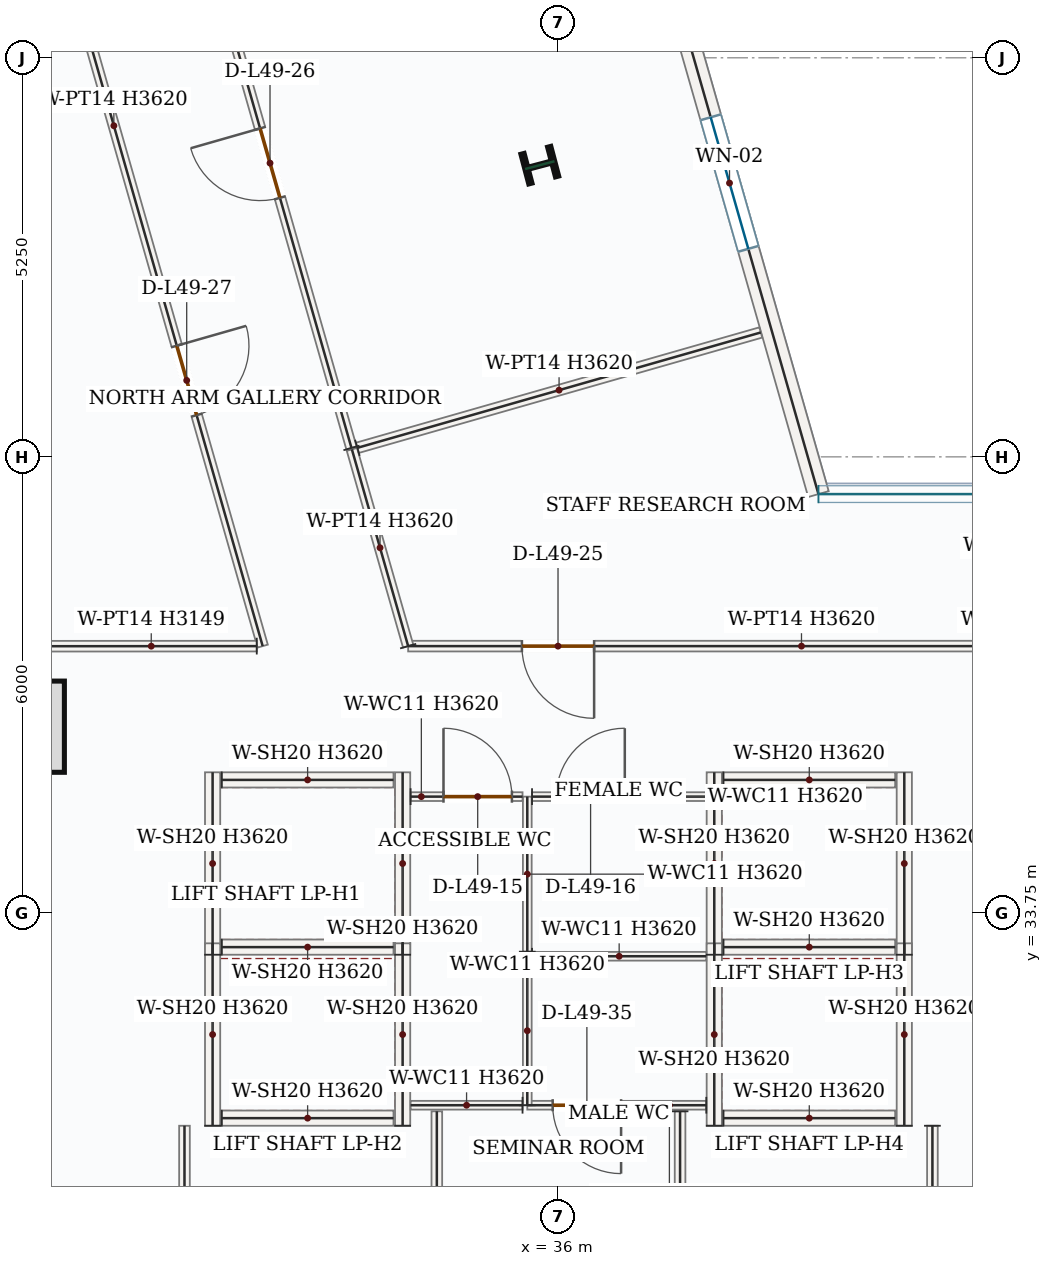
"""IFC4 building model, lengths in metres.
Left out: names, types, materials, properties, quantities, classifications, styles, units other than length and angle.
Written with IfcOpenShell. Run it as: python <this file> out.ifc"""

import sys

from ifc_helpers import new_model, si_unit, direction, frame, frame_2d, origin, origin_2d, place, context, subcontext, project, spatial, rectangle, i_section, extrude, source, transform, mapped, element, fill, save


model = new_model("IFC4")
c1 = context("Model", 3, precision=1e-05, world=origin(), true_north=direction((0.0, 1.0)))
c2 = subcontext(c1, "Body", "Model", "MODEL_VIEW")
j1 = project(units=[si_unit("LENGTHUNIT", "METRE"), si_unit("PLANEANGLEUNIT", "RADIAN")], contexts=[c1])
p1 = place(None, origin())
s1 = spatial("IfcSite", under=j1, at=p1, CompositionType="ELEMENT")
p2 = place(p1, origin())
s2 = spatial("IfcBuilding", under=s1, at=p2, CompositionType="ELEMENT")
p3 = place(p2, frame((0.0, 0.0, 209.7)))
s3 = spatial("IfcBuildingStorey", under=s2, at=p3, CompositionType="ELEMENT", Elevation=209.7)
m1 = source(origin(), c2, "Body", "SweptSolid", [
    extrude(rectangle(XDim=1.2, YDim=1.2, at=origin_2d()), origin(), (0.0, 0.0, 1.0), 3.9),
])
p4 = place(p3, frame((28.9, 36.2, 0.0), z_axis=(0.0, 0.0, 1.0), x_axis=(1.0, 0.0, 0.0)))
e1 = element("IfcColumn", 1, at=p4, inside=s3, PredefinedType="COLUMN", context=c2, shape_type="MappedRepresentation", body=[
    mapped(m1, transform((0.0, 0.0, 0.0), x_axis=(1.0, 0.0, 0.0), y_axis=(0.0, 1.0, 0.0), z_axis=(0.0, 0.0, 1.0), scale=1.0)),
])
m2 = source(origin(), c2, "Body", "SweptSolid", [
    extrude(i_section(OverallWidth=0.404, OverallDepth=0.407, WebThickness=0.027, FlangeThickness=0.044, FilletRadius=0.018, at=origin_2d()), origin(), (0.0, 0.0, 1.0), 3.9),
])
p5 = place(p3, frame((35.755, 43.588, 0.0), z_axis=(0.0, 0.0, 1.0), x_axis=(-0.255445757936, 0.966823388604, 0.0)))
e2 = element("IfcColumn", 2, at=p5, inside=s3, PredefinedType="COLUMN", context=c2, shape_type="MappedRepresentation", body=[
    mapped(m2, transform((0.0, 0.0, 0.0), x_axis=(1.0, 0.0, 0.0), y_axis=(0.0, 1.0, 0.0), z_axis=(0.0, 0.0, 1.0), scale=1.0)),
])
p6 = place(p3, frame((37.08, 47.445, 0.0), z_axis=(0.0, 0.0, 1.0), x_axis=(0.27496352843, -0.961454657295, 0.0)))
e3 = element("IfcWall", 3, at=p6, inside=s3, PredefinedType="SOLIDWALL", context=c2, shape_type="SweptSolid", body=[
    extrude(rectangle(XDim=8.513, YDim=0.28, at=frame_2d((4.257, 0.0))), origin(), (0.0, 0.0, 1.0), 3.62),
])
p7 = place(p6, frame((3.357, 0.0, 0.85)))
e4 = element("IfcOpeningElement", 4, at=p7, cuts=e3, PredefinedType="OPENING", context=c2, shape_type="SweptSolid", body=[
    extrude(rectangle(XDim=1.8, YDim=1.75, at=frame_2d((0.9, 0.875))), frame((0.0, 0.15, 0.0), z_axis=(0.0, -1.0, 0.0), x_axis=(1.0, 0.0, 0.0)), (0.0, 0.0, 1.0), 0.3),
])
m3 = source(origin(), c2, "Body", "SweptSolid", [
    extrude(rectangle(XDim=2.4, YDim=0.2, at=frame_2d((1.2, 0.0))), origin(), (0.0, 0.0, 1.0), 3.62),
])
for number, where, z_axis, x_axis in (
    (5, (31.45, 33.2, 0.0), (0.0, 0.0, 1.0), (0.0, 1.0, 0.0)),
    (6, (33.95, 33.2, 0.0), (0.0, 0.0, 1.0), (0.0, 1.0, 0.0)),
):
    element("IfcWall", number, at=place(p3, frame(where, z_axis=z_axis, x_axis=x_axis)), inside=s3, PredefinedType="SOLIDWALL", context=c2, shape_type="MappedRepresentation", body=[
        mapped(m3, transform((0.0, 0.0, 0.0), x_axis=(1.0, 0.0, 0.0), y_axis=(0.0, 1.0, 0.0), z_axis=(0.0, 0.0, 1.0), scale=1.0)),
    ])
m4 = source(origin(), c2, "Body", "SweptSolid", [
    extrude(rectangle(XDim=2.26, YDim=0.2, at=frame_2d((1.13, 0.0))), origin(), (0.0, 0.0, 1.0), 3.62),
])
for number, where, z_axis, x_axis in (
    (7, (31.57, 33.3, 0.0), (0.0, 0.0, 1.0), (1.0, 0.0, 0.0)),
    (8, (31.57, 35.5, 0.0), (0.0, 0.0, 1.0), (1.0, 0.0, 0.0)),
):
    element("IfcWall", number, at=place(p3, frame(where, z_axis=z_axis, x_axis=x_axis)), inside=s3, PredefinedType="SOLIDWALL", context=c2, shape_type="MappedRepresentation", body=[
        mapped(m4, transform((0.0, 0.0, 0.0), x_axis=(1.0, 0.0, 0.0), y_axis=(0.0, 1.0, 0.0), z_axis=(0.0, 0.0, 1.0), scale=1.0)),
    ])
for number, where, z_axis, x_axis in (
    (9, (31.45, 30.95, 0.0), (0.0, 0.0, 1.0), (0.0, 1.0, 0.0)),
    (10, (33.95, 30.95, 0.0), (0.0, 0.0, 1.0), (0.0, 1.0, 0.0)),
):
    element("IfcWall", number, at=place(p3, frame(where, z_axis=z_axis, x_axis=x_axis)), inside=s3, PredefinedType="SOLIDWALL", context=c2, shape_type="MappedRepresentation", body=[
        mapped(m3, transform((0.0, 0.0, 0.0), x_axis=(1.0, 0.0, 0.0), y_axis=(0.0, 1.0, 0.0), z_axis=(0.0, 0.0, 1.0), scale=1.0)),
    ])
p8 = place(p3, frame((31.57, 31.05, 0.0), z_axis=(0.0, 0.0, 1.0), x_axis=(1.0, 0.0, 0.0)))
e11 = element("IfcWall", 11, at=p8, inside=s3, PredefinedType="SOLIDWALL", context=c2, shape_type="MappedRepresentation", body=[
    mapped(m4, transform((0.0, 0.0, 0.0), x_axis=(1.0, 0.0, 0.0), y_axis=(0.0, 1.0, 0.0), z_axis=(0.0, 0.0, 1.0), scale=1.0)),
])
for number, where, z_axis, x_axis in (
    (12, (38.05, 33.2, 0.0), (0.0, 0.0, 1.0), (0.0, 1.0, 0.0)),
    (13, (40.55, 33.2, 0.0), (0.0, 0.0, 1.0), (0.0, 1.0, 0.0)),
):
    element("IfcWall", number, at=place(p3, frame(where, z_axis=z_axis, x_axis=x_axis)), inside=s3, PredefinedType="SOLIDWALL", context=c2, shape_type="MappedRepresentation", body=[
        mapped(m3, transform((0.0, 0.0, 0.0), x_axis=(1.0, 0.0, 0.0), y_axis=(0.0, 1.0, 0.0), z_axis=(0.0, 0.0, 1.0), scale=1.0)),
    ])
for number, where, z_axis, x_axis in (
    (14, (38.17, 33.3, 0.0), (0.0, 0.0, 1.0), (1.0, 0.0, 0.0)),
    (15, (38.17, 35.5, 0.0), (0.0, 0.0, 1.0), (1.0, 0.0, 0.0)),
):
    element("IfcWall", number, at=place(p3, frame(where, z_axis=z_axis, x_axis=x_axis)), inside=s3, PredefinedType="SOLIDWALL", context=c2, shape_type="MappedRepresentation", body=[
        mapped(m4, transform((0.0, 0.0, 0.0), x_axis=(1.0, 0.0, 0.0), y_axis=(0.0, 1.0, 0.0), z_axis=(0.0, 0.0, 1.0), scale=1.0)),
    ])
for number, where, z_axis, x_axis in (
    (16, (38.05, 30.95, 0.0), (0.0, 0.0, 1.0), (0.0, 1.0, 0.0)),
    (17, (40.55, 30.95, 0.0), (0.0, 0.0, 1.0), (0.0, 1.0, 0.0)),
):
    element("IfcWall", number, at=place(p3, frame(where, z_axis=z_axis, x_axis=x_axis)), inside=s3, PredefinedType="SOLIDWALL", context=c2, shape_type="MappedRepresentation", body=[
        mapped(m3, transform((0.0, 0.0, 0.0), x_axis=(1.0, 0.0, 0.0), y_axis=(0.0, 1.0, 0.0), z_axis=(0.0, 0.0, 1.0), scale=1.0)),
    ])
p9 = place(p3, frame((38.17, 31.05, 0.0), z_axis=(0.0, 0.0, 1.0), x_axis=(1.0, 0.0, 0.0)))
e18 = element("IfcWall", 18, at=p9, inside=s3, PredefinedType="SOLIDWALL", context=c2, shape_type="MappedRepresentation", body=[
    mapped(m4, transform((0.0, 0.0, 0.0), x_axis=(1.0, 0.0, 0.0), y_axis=(0.0, 1.0, 0.0), z_axis=(0.0, 0.0, 1.0), scale=1.0)),
])
p10 = place(p3, frame((37.945, 31.22, 0.0), z_axis=(0.0, 0.0, 1.0), x_axis=(-1.0, 0.0, 0.0)))
e19 = element("IfcWall", 19, at=p10, inside=s3, PredefinedType="PARTITIONING", context=c2, shape_type="SweptSolid", body=[
    extrude(rectangle(XDim=2.355, YDim=0.115, at=frame_2d((1.177, 0.0))), origin(), (0.0, 0.0, 1.0), 3.62),
])
p11 = place(p10, frame((1.121, 0.0, 0.0)))
e20 = element("IfcOpeningElement", 20, at=p11, cuts=e19, PredefinedType="OPENING", context=c2, shape_type="SweptSolid", body=[
    extrude(rectangle(XDim=0.9, YDim=2.1, at=frame_2d((0.45, 1.05))), frame((0.0, 0.067, 0.0), z_axis=(0.0, -1.0, 0.0), x_axis=(1.0, 0.0, 0.0)), (0.0, 0.0, 1.0), 0.135),
])
m5 = source(origin(), c2, "Body", "SweptSolid", [
    extrude(rectangle(XDim=1.96, YDim=0.115, at=frame_2d((0.98, 0.0))), origin(), (0.0, 0.0, 1.0), 3.62),
])
p12 = place(p3, frame((35.59, 31.22, 0.0), z_axis=(0.0, 0.0, 1.0), x_axis=(0.0, 1.0, 0.0)))
e21 = element("IfcWall", 21, at=p12, inside=s3, PredefinedType="PARTITIONING", context=c2, shape_type="MappedRepresentation", body=[
    mapped(m5, transform((0.0, 0.0, 0.0), x_axis=(1.0, 0.0, 0.0), y_axis=(0.0, 1.0, 0.0), z_axis=(0.0, 0.0, 1.0), scale=1.0)),
])
m6 = source(origin(), c2, "Body", "SweptSolid", [
    extrude(rectangle(XDim=2.292, YDim=0.115, at=frame_2d((1.146, 0.0))), origin(), (0.0, 0.0, 1.0), 3.62),
])
p13 = place(p3, frame((35.653, 33.18, 0.0), z_axis=(0.0, 0.0, 1.0), x_axis=(1.0, 0.0, 0.0)))
e22 = element("IfcWall", 22, at=p13, inside=s3, PredefinedType="PARTITIONING", context=c2, shape_type="MappedRepresentation", body=[
    mapped(m6, transform((0.0, 0.0, 0.0), x_axis=(1.0, 0.0, 0.0), y_axis=(0.0, 1.0, 0.0), z_axis=(0.0, 0.0, 1.0), scale=1.0)),
])
m7 = source(origin(), c2, "Body", "SweptSolid", [
    extrude(rectangle(XDim=2.04, YDim=0.115, at=frame_2d((1.02, 0.0))), origin(), (0.0, 0.0, 1.0), 3.62),
])
p14 = place(p3, frame((35.59, 33.24, 0.0), z_axis=(0.0, 0.0, 1.0), x_axis=(0.0, 1.0, 0.0)))
e23 = element("IfcWall", 23, at=p14, inside=s3, PredefinedType="PARTITIONING", context=c2, shape_type="MappedRepresentation", body=[
    mapped(m7, transform((0.0, 0.0, 0.0), x_axis=(1.0, 0.0, 0.0), y_axis=(0.0, 1.0, 0.0), z_axis=(0.0, 0.0, 1.0), scale=1.0)),
])
p15 = place(p3, frame((35.653, 35.28, 0.0), z_axis=(0.0, 0.0, 1.0), x_axis=(1.0, 0.0, 0.0)))
e24 = element("IfcWall", 24, at=p15, inside=s3, PredefinedType="PARTITIONING", context=c2, shape_type="SweptSolid", body=[
    extrude(rectangle(XDim=2.292, YDim=0.115, at=frame_2d((1.146, 0.0))), origin(), (0.0, 0.0, 1.0), 3.62),
])
p16 = place(p15, frame((0.32, 0.0, 0.0)))
e25 = element("IfcOpeningElement", 25, at=p16, cuts=e24, PredefinedType="OPENING", context=c2, shape_type="SweptSolid", body=[
    extrude(rectangle(XDim=0.9, YDim=2.1, at=frame_2d((0.45, 1.05))), frame((0.0, 0.067, 0.0), z_axis=(0.0, -1.0, 0.0), x_axis=(1.0, 0.0, 0.0)), (0.0, 0.0, 1.0), 0.135),
])
m8 = source(origin(), c2, "Body", "SweptSolid", [
    extrude(rectangle(XDim=1.473, YDim=0.115, at=frame_2d((0.736, 0.0))), origin(), (0.0, 0.0, 1.0), 3.62),
])
p17 = place(p3, frame((35.528, 31.22, 0.0), z_axis=(0.0, 0.0, 1.0), x_axis=(-1.0, 0.0, 0.0)))
e26 = element("IfcWall", 26, at=p17, inside=s3, PredefinedType="PARTITIONING", context=c2, shape_type="MappedRepresentation", body=[
    mapped(m8, transform((0.0, 0.0, 0.0), x_axis=(1.0, 0.0, 0.0), y_axis=(0.0, 1.0, 0.0), z_axis=(0.0, 0.0, 1.0), scale=1.0)),
])
p18 = place(p3, frame((34.055, 35.28, 0.0), z_axis=(0.0, 0.0, 1.0), x_axis=(1.0, 0.0, 0.0)))
e27 = element("IfcWall", 27, at=p18, inside=s3, PredefinedType="PARTITIONING", context=c2, shape_type="SweptSolid", body=[
    extrude(rectangle(XDim=1.473, YDim=0.115, at=frame_2d((0.736, 0.0))), origin(), (0.0, 0.0, 1.0), 3.62),
])
p19 = place(p18, frame((0.433, 0.0, 0.0)))
e28 = element("IfcOpeningElement", 28, at=p19, cuts=e27, PredefinedType="OPENING", context=c2, shape_type="SweptSolid", body=[
    extrude(rectangle(XDim=0.9, YDim=2.1, at=frame_2d((0.45, 1.05))), frame((0.0, 0.067, 0.0), z_axis=(0.0, -1.0, 0.0), x_axis=(1.0, 0.0, 0.0)), (0.0, 0.0, 1.0), 0.135),
])
m9 = source(origin(), c2, "Body", "SweptSolid", [
    extrude(rectangle(XDim=3.2, YDim=0.14, at=frame_2d((1.6, 0.0))), origin(), (0.0, 0.0, 1.0), 3.62),
])
for number, where, z_axis, x_axis in (
    (29, (34.4, 27.94, 0.0), (0.0, 0.0, 1.0), (0.0, 1.0, 0.0)),
    (30, (37.6, 31.14, 0.0), (0.0, 0.0, 1.0), (0.0, -1.0, 0.0)),
):
    element("IfcWall", number, at=place(p3, frame(where, z_axis=z_axis, x_axis=x_axis)), inside=s3, PredefinedType="PARTITIONING", context=c2, shape_type="MappedRepresentation", body=[
        mapped(m9, transform((0.0, 0.0, 0.0), x_axis=(1.0, 0.0, 0.0), y_axis=(0.0, 1.0, 0.0), z_axis=(0.0, 0.0, 1.0), scale=1.0)),
    ])
m10 = source(origin(), c2, "Body", "SweptSolid", [
    extrude(rectangle(XDim=2.935, YDim=0.14, at=frame_2d((1.468, 0.0))), origin(), (0.0, 0.0, 1.0), 3.62),
])
p20 = place(p3, frame((31.08, 28.015, 0.0), z_axis=(0.0, 0.0, 1.0), x_axis=(0.0, 1.0, 0.0)))
e31 = element("IfcWall", 31, at=p20, inside=s3, PredefinedType="PARTITIONING", context=c2, shape_type="MappedRepresentation", body=[
    mapped(m10, transform((0.0, 0.0, 0.0), x_axis=(1.0, 0.0, 0.0), y_axis=(0.0, 1.0, 0.0), z_axis=(0.0, 0.0, 1.0), scale=1.0)),
])
m11 = source(origin(), c2, "Body", "SweptSolid", [
    extrude(rectangle(XDim=3.01, YDim=0.14, at=frame_2d((1.505, 0.0))), origin(), (0.0, 0.0, 1.0), 3.62),
])
p21 = place(p3, frame((40.92, 30.95, 0.0), z_axis=(0.0, 0.0, 1.0), x_axis=(0.0, -1.0, 0.0)))
e32 = element("IfcWall", 32, at=p21, inside=s3, PredefinedType="PARTITIONING", context=c2, shape_type="MappedRepresentation", body=[
    mapped(m11, transform((0.0, 0.0, 0.0), x_axis=(1.0, 0.0, 0.0), y_axis=(0.0, 1.0, 0.0), z_axis=(0.0, 0.0, 1.0), scale=1.0)),
])
p22 = place(p3, frame((41.775, 37.26, 0.0), z_axis=(0.0, 0.0, 1.0), x_axis=(-1.0, 0.0, 0.0)))
e33 = element("IfcWall", 33, at=p22, inside=s3, PredefinedType="PARTITIONING", context=c2, shape_type="SweptSolid", body=[
    extrude(rectangle(XDim=7.753, YDim=0.14, at=frame_2d((3.876, 0.0))), origin(), (0.0, 0.0, 1.0), 3.62),
])
p23 = place(p22, frame((5.306, 0.0, 0.0)))
e34 = element("IfcOpeningElement", 34, at=p23, cuts=e33, PredefinedType="OPENING", context=c2, shape_type="SweptSolid", body=[
    extrude(rectangle(XDim=0.95, YDim=2.15, at=frame_2d((0.475, 1.075))), frame((0.0, 0.08, 0.0), z_axis=(0.0, -1.0, 0.0), x_axis=(1.0, 0.0, 0.0)), (0.0, 0.0, 1.0), 0.16),
])
m12 = source(origin(), c2, "Body", "SweptSolid", [
    extrude(rectangle(XDim=2.692, YDim=0.14, at=frame_2d((1.346, 0.0))), origin(), (0.0, 0.0, 1.0), 3.62),
])
p24 = place(p3, frame((34.023, 37.26, 0.0), z_axis=(0.0, 0.0, 1.0), x_axis=(-0.27500862401, 0.961441759401, 0.0)))
e35 = element("IfcWall", 35, at=p24, inside=s3, PredefinedType="PARTITIONING", context=c2, shape_type="MappedRepresentation", body=[
    mapped(m12, transform((0.0, 0.0, 0.0), x_axis=(1.0, 0.0, 0.0), y_axis=(0.0, 1.0, 0.0), z_axis=(0.0, 0.0, 1.0), scale=1.0)),
])
m13 = source(origin(), c2, "Body", "SweptSolid", [
    extrude(rectangle(XDim=5.52, YDim=0.14, at=frame_2d((2.76, 0.0))), origin(), (0.0, 0.0, 1.0), 3.62),
])
p25 = place(p3, frame((33.354, 39.869, 0.0), z_axis=(0.0, 0.0, 1.0), x_axis=(0.961455490798, 0.274960613933, 0.0)))
e36 = element("IfcWall", 36, at=p25, inside=s3, PredefinedType="PARTITIONING", context=c2, shape_type="MappedRepresentation", body=[
    mapped(m13, transform((0.0, 0.0, 0.0), x_axis=(1.0, 0.0, 0.0), y_axis=(0.0, 1.0, 0.0), z_axis=(0.0, 0.0, 1.0), scale=1.0)),
])
p26 = place(p3, frame((33.277, 39.867, 0.0), z_axis=(0.0, 0.0, 1.0), x_axis=(-0.274985856522, 0.96144827147, 0.0)))
e37 = element("IfcWall", 37, at=p26, inside=s3, PredefinedType="PARTITIONING", context=c2, shape_type="SweptSolid", body=[
    extrude(rectangle(XDim=7.795, YDim=0.14, at=frame_2d((3.897, 0.0))), origin(), (0.0, 0.0, 1.0), 3.62),
])
p27 = place(p26, frame((3.423, 0.0, 0.0)))
e38 = element("IfcOpeningElement", 38, at=p27, cuts=e37, PredefinedType="OPENING", context=c2, shape_type="SweptSolid", body=[
    extrude(rectangle(XDim=0.95, YDim=2.15, at=frame_2d((0.475, 1.075))), frame((0.0, 0.08, 0.0), z_axis=(0.0, -1.0, 0.0), x_axis=(1.0, 0.0, 0.0)), (0.0, 0.0, 1.0), 0.16),
])
p28 = place(p3, frame((29.365, 46.856, 0.0), z_axis=(0.0, 0.0, 1.0), x_axis=(0.274969885882, -0.961452839123, 0.0)))
e39 = element("IfcWall", 39, at=p28, inside=s3, PredefinedType="PARTITIONING", context=c2, shape_type="SweptSolid", body=[
    extrude(rectangle(XDim=9.981, YDim=0.14, at=frame_2d((4.99, 0.0))), origin(), (0.0, 0.0, 1.0), 3.62),
])
p29 = place(p28, frame((5.87, 0.0, 0.0)))
e40 = element("IfcOpeningElement", 40, at=p29, cuts=e39, PredefinedType="OPENING", context=c2, shape_type="SweptSolid", body=[
    extrude(rectangle(XDim=0.95, YDim=2.15, at=frame_2d((0.475, 1.075))), frame((0.0, 0.08, 0.0), z_axis=(0.0, -1.0, 0.0), x_axis=(1.0, 0.0, 0.0)), (0.0, 0.0, 1.0), 0.16),
])
m14 = source(origin(), c2, "Body", "SweptSolid", [
    extrude(rectangle(XDim=2.776, YDim=0.14, at=frame_2d((1.388, 0.0))), origin(), (0.0, 0.0, 1.0), 3.149),
])
p30 = place(p3, frame((32.031, 37.26, 0.0), z_axis=(0.0, 0.0, 1.0), x_axis=(-0.999999903325, -0.000439715022, 0.0)))
e41 = element("IfcWall", 41, at=p30, inside=s3, PredefinedType="PARTITIONING", context=c2, shape_type="MappedRepresentation", body=[
    mapped(m14, transform((0.0, 0.0, 0.0), x_axis=(1.0, 0.0, 0.0), y_axis=(0.0, 1.0, 0.0), z_axis=(0.0, 0.0, 1.0), scale=1.0)),
])
m15 = source(origin(), c2, "Body", "SweptSolid", [
    extrude(rectangle(XDim=1.8, YDim=1.75, at=frame_2d((0.9, 0.875))), frame((0.0, 0.03, 0.0), z_axis=(0.0, -1.0, 0.0), x_axis=(1.0, 0.0, 0.0)), (0.0, 0.0, 1.0), 0.06),
])
p31 = place(p7, origin())
e42 = element("IfcWindow", 42, at=p31, inside=s3, PartitioningType="DOUBLE_PANEL_VERTICAL", PredefinedType="WINDOW", context=c2, shape_type="MappedRepresentation", body=[
    mapped(m15, transform((0.0, 0.0, 0.0), x_axis=(1.0, 0.0, 0.0), y_axis=(0.0, 1.0, 0.0), z_axis=(0.0, 0.0, 1.0), scale=1.0)),
])
fill(e4, e42)
m16 = source(origin(), c2, "Body", "SweptSolid", [
    extrude(rectangle(XDim=0.9, YDim=2.1, at=frame_2d((0.45, 1.05))), frame((0.0, 0.025, 0.0), z_axis=(0.0, -1.0, 0.0), x_axis=(1.0, 0.0, 0.0)), (0.0, 0.0, 1.0), 0.05),
])
p32 = place(p19, origin())
e43 = element("IfcDoor", 43, at=p32, inside=s3, OperationType="SINGLE_SWING_LEFT", PredefinedType="DOOR", context=c2, shape_type="MappedRepresentation", body=[
    mapped(m16, transform((0.0, 0.0, 0.0), x_axis=(1.0, 0.0, 0.0), y_axis=(0.0, 1.0, 0.0), z_axis=(0.0, 0.0, 1.0), scale=1.0)),
])
fill(e28, e43)
p33 = place(p16, origin())
e44 = element("IfcDoor", 44, at=p33, inside=s3, OperationType="SINGLE_SWING_RIGHT", PredefinedType="DOOR", context=c2, shape_type="MappedRepresentation", body=[
    mapped(m16, transform((0.0, 0.0, 0.0), x_axis=(1.0, 0.0, 0.0), y_axis=(0.0, 1.0, 0.0), z_axis=(0.0, 0.0, 1.0), scale=1.0)),
])
fill(e25, e44)
m17 = source(origin(), c2, "Body", "SweptSolid", [
    extrude(rectangle(XDim=0.95, YDim=2.15, at=frame_2d((0.475, 1.075))), frame((0.0, 0.025, 0.0), z_axis=(0.0, -1.0, 0.0), x_axis=(1.0, 0.0, 0.0)), (0.0, 0.0, 1.0), 0.05),
])
p34 = place(p23, origin())
e45 = element("IfcDoor", 45, at=p34, inside=s3, OperationType="SINGLE_SWING_LEFT", PredefinedType="DOOR", context=c2, shape_type="MappedRepresentation", body=[
    mapped(m17, transform((0.0, 0.0, 0.0), x_axis=(1.0, 0.0, 0.0), y_axis=(0.0, 1.0, 0.0), z_axis=(0.0, 0.0, 1.0), scale=1.0)),
])
fill(e34, e45)
p35 = place(p27, origin())
e46 = element("IfcDoor", 46, at=p35, inside=s3, OperationType="SINGLE_SWING_RIGHT", PredefinedType="DOOR", context=c2, shape_type="MappedRepresentation", body=[
    mapped(m17, transform((0.0, 0.0, 0.0), x_axis=(1.0, 0.0, 0.0), y_axis=(0.0, 1.0, 0.0), z_axis=(0.0, 0.0, 1.0), scale=1.0)),
])
fill(e38, e46)
p36 = place(p29, origin())
e47 = element("IfcDoor", 47, at=p36, inside=s3, OperationType="SINGLE_SWING_LEFT", PredefinedType="DOOR", context=c2, shape_type="MappedRepresentation", body=[
    mapped(m17, transform((0.0, 0.0, 0.0), x_axis=(1.0, 0.0, 0.0), y_axis=(0.0, 1.0, 0.0), z_axis=(0.0, 0.0, 1.0), scale=1.0)),
])
fill(e40, e47)
p37 = place(p11, origin())
e48 = element("IfcDoor", 48, at=p37, inside=s3, OperationType="SINGLE_SWING_LEFT", PredefinedType="DOOR", context=c2, shape_type="MappedRepresentation", body=[
    mapped(m16, transform((0.0, 0.0, 0.0), x_axis=(1.0, 0.0, 0.0), y_axis=(0.0, 1.0, 0.0), z_axis=(0.0, 0.0, 1.0), scale=1.0)),
])
fill(e20, e48)
save(model, sys.argv[1])
